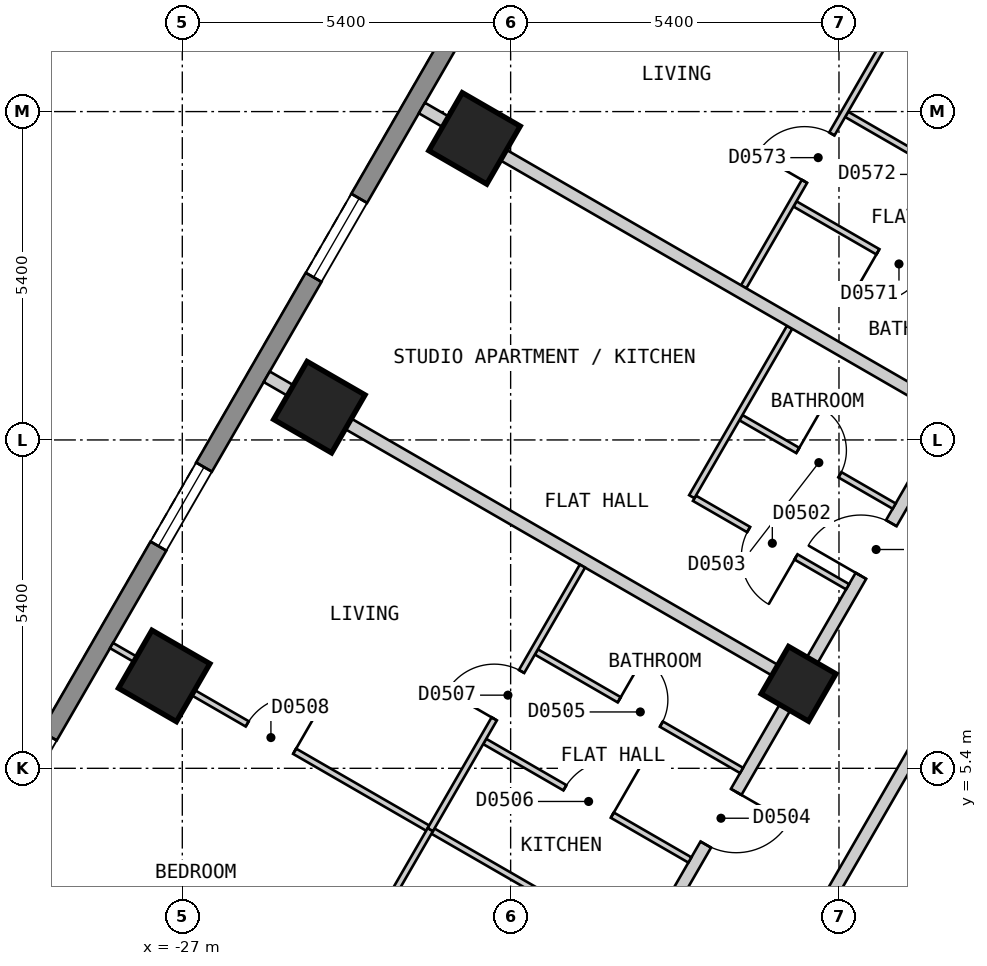
"""IFC4 building model, lengths in metres.
Left out: names, types, materials, properties, quantities, classifications, styles, units other than length and angle.
Written with IfcOpenShell. Run it as: python <this file> out.ifc"""

import sys

from ifc_helpers import new_model, si_unit, direction, frame, frame_2d, origin, origin_2d, place, context, subcontext, project, spatial, polyline, rectangle, outline, extrude, element, fill, save


model = new_model("IFC4")
c1 = context("Model", 3, precision=1e-05, world=origin(), true_north=direction((0.0, 1.0)))
c2 = subcontext(c1, "Body", "Model", "MODEL_VIEW")
j1 = project(units=[si_unit("LENGTHUNIT", "METRE"), si_unit("PLANEANGLEUNIT", "RADIAN")], contexts=[c1])
p1 = place(None, origin())
s1 = spatial("IfcSite", under=j1, at=p1, CompositionType="ELEMENT")
p2 = place(p1, origin())
s2 = spatial("IfcBuilding", under=s1, at=p2, CompositionType="ELEMENT")
p3 = place(p2, frame((0.0, 0.0, 50.4)))
s3 = spatial("IfcBuildingStorey", under=s2, at=p3, CompositionType="ELEMENT", Elevation=50.4)
for number, where, z_axis, x_axis in (
    (1, (-22.194, 15.759, 0.0), (0.0, 0.0, 1.0), (-0.5, -0.866, 0.0)),
    (2, (-24.746, 11.339, 0.0), (0.0, 0.0, 1.0), (-0.5, -0.866, 0.0)),
    (3, (-27.298, 6.919, 0.0), (0.0, 0.0, 1.0), (-0.5, -0.866, 0.0)),
):
    element("IfcColumn", number, at=place(p3, frame(where, z_axis=z_axis, x_axis=x_axis)), inside=s3, PredefinedType="COLUMN", context=c2, shape_type="SweptSolid", body=[
        extrude(rectangle(XDim=1.1, YDim=1.1, at=origin_2d()), origin(), (0.0, 0.0, 1.0), 3.0),
    ])
p4 = place(p3, frame((-16.865, 6.789, 0.0), z_axis=(0.0, 0.0, 1.0), x_axis=(-0.499984884929, -0.866034130299, 0.0)))
e4 = element("IfcColumn", 4, at=p4, inside=s3, PredefinedType="COLUMN", context=c2, shape_type="SweptSolid", body=[
    extrude(rectangle(XDim=0.9, YDim=0.9, at=origin_2d()), origin(), (0.0, 0.0, 1.0), 3.0),
])
p5 = place(p3, frame((-17.71, 25.825, 0.0), z_axis=(0.0, 0.0, 1.0), x_axis=(-0.500001938803, -0.866024284413, 0.0)))
e5 = element("IfcWall", 5, at=p5, inside=s3, PredefinedType="SOLIDWALL", context=c2, shape_type="SweptSolid", body=[
    extrude(outline(polyline([(0.0, -0.15), (27.02, -0.15), (26.94, 0.15), (0.08, 0.15), (0.0, -0.15)])), origin(), (0.0, 0.0, 1.0), 2.7),
])
p6 = place(p5, frame((2.553, 0.0, 0.15)))
e6 = element("IfcOpeningElement", 6, at=p6, cuts=e5, PredefinedType="OPENING", context=c2, shape_type="SweptSolid", body=[
    extrude(rectangle(XDim=1.5, YDim=2.1, at=frame_2d((0.75, 1.05))), frame((0.0, 0.16, 0.0), z_axis=(0.0, -1.0, 0.0), x_axis=(1.0, 0.0, 0.0)), (0.0, 0.0, 1.0), 0.32),
])
p7 = place(p5, frame((7.658, 0.0, 0.15)))
e7 = element("IfcOpeningElement", 7, at=p7, cuts=e5, PredefinedType="OPENING", context=c2, shape_type="SweptSolid", body=[
    extrude(rectangle(XDim=1.5, YDim=2.1, at=frame_2d((0.75, 1.05))), frame((0.0, 0.16, 0.0), z_axis=(0.0, -1.0, 0.0), x_axis=(1.0, 0.0, 0.0)), (0.0, 0.0, 1.0), 0.32),
])
p8 = place(p5, frame((12.761, 0.0, 0.15)))
e8 = element("IfcOpeningElement", 8, at=p8, cuts=e5, PredefinedType="OPENING", context=c2, shape_type="SweptSolid", body=[
    extrude(rectangle(XDim=1.5, YDim=2.1, at=frame_2d((0.75, 1.05))), frame((0.0, 0.16, 0.0), z_axis=(0.0, -1.0, 0.0), x_axis=(1.0, 0.0, 0.0)), (0.0, 0.0, 1.0), 0.32),
])
p9 = place(p5, frame((17.865, 0.0, 0.15)))
e9 = element("IfcOpeningElement", 9, at=p9, cuts=e5, PredefinedType="OPENING", context=c2, shape_type="SweptSolid", body=[
    extrude(rectangle(XDim=1.5, YDim=2.1, at=frame_2d((0.75, 1.05))), frame((0.0, 0.16, 0.0), z_axis=(0.0, -1.0, 0.0), x_axis=(1.0, 0.0, 0.0)), (0.0, 0.0, 1.0), 0.32),
])
p10 = place(p5, frame((22.969, 0.0, 0.15)))
e10 = element("IfcOpeningElement", 10, at=p10, cuts=e5, PredefinedType="OPENING", context=c2, shape_type="SweptSolid", body=[
    extrude(rectangle(XDim=1.5, YDim=2.1, at=frame_2d((0.75, 1.05))), frame((0.0, 0.16, 0.0), z_axis=(0.0, -1.0, 0.0), x_axis=(1.0, 0.0, 0.0)), (0.0, 0.0, 1.0), 0.32),
])
p11 = place(p3, frame((-18.244, -0.001, 0.0), z_axis=(0.0, 0.0, 1.0), x_axis=(0.499962999376, 0.866046765051, 0.0)))
e11 = element("IfcWall", 11, at=p11, inside=s3, PredefinedType="PARTITIONING", context=c2, shape_type="SweptSolid", body=[
    extrude(rectangle(XDim=18.245, YDim=0.2, at=frame_2d((9.123, 0.0))), origin(), (0.0, 0.0, 1.0), 2.7),
])
p12 = place(p11, frame((8.672, 0.0, 0.0)))
e12 = element("IfcOpeningElement", 12, at=p12, cuts=e11, PredefinedType="OPENING", context=c2, shape_type="SweptSolid", body=[
    extrude(rectangle(XDim=0.9, YDim=2.1, at=frame_2d((0.45, 1.05))), frame((0.0, 0.11, 0.0), z_axis=(0.0, -1.0, 0.0), x_axis=(1.0, 0.0, 0.0)), (0.0, 0.0, 1.0), 0.22),
])
p13 = place(p3, frame((-20.727, 0.099, 0.0), z_axis=(0.0, 0.0, 1.0), x_axis=(0.499993204491, 0.866029327138, 0.0)))
e13 = element("IfcWall", 13, at=p13, inside=s3, PredefinedType="PARTITIONING", context=c2, shape_type="SweptSolid", body=[
    extrude(rectangle(XDim=20.554, YDim=0.2, at=frame_2d((10.277, 0.0))), origin(), (0.0, 0.0, 1.0), 2.7),
])
p14 = place(p13, frame((9.776, 0.0, 0.0)))
e14 = element("IfcOpeningElement", 14, at=p14, cuts=e13, PredefinedType="OPENING", context=c2, shape_type="SweptSolid", body=[
    extrude(rectangle(XDim=1.0, YDim=2.1, at=frame_2d((0.5, 1.05))), frame((0.0, 0.11, 0.0), z_axis=(0.0, -1.0, 0.0), x_axis=(1.0, 0.0, 0.0)), (0.0, 0.0, 1.0), 0.22),
])
p15 = place(p13, frame((4.673, 0.0, 0.0)))
e15 = element("IfcOpeningElement", 15, at=p15, cuts=e13, PredefinedType="OPENING", context=c2, shape_type="SweptSolid", body=[
    extrude(rectangle(XDim=1.0, YDim=2.1, at=frame_2d((0.5, 1.05))), frame((0.0, 0.11, 0.0), z_axis=(0.0, -1.0, 0.0), x_axis=(1.0, 0.0, 0.0)), (0.0, 0.0, 1.0), 0.22),
])
p16 = place(p13, frame((14.88, 0.0, 0.0)))
e16 = element("IfcOpeningElement", 16, at=p16, cuts=e13, PredefinedType="OPENING", context=c2, shape_type="SweptSolid", body=[
    extrude(rectangle(XDim=1.0, YDim=2.1, at=frame_2d((0.5, 1.05))), frame((0.0, 0.11, 0.0), z_axis=(0.0, -1.0, 0.0), x_axis=(1.0, 0.0, 0.0)), (0.0, 0.0, 1.0), 0.22),
])
p17 = place(p3, frame((-21.177, 7.314, 0.0), z_axis=(0.0, 0.0, 1.0), x_axis=(0.865979019114, -0.500080332001, 0.0)))
e17 = element("IfcWall", 17, at=p17, inside=s3, PredefinedType="PARTITIONING", context=c2, shape_type="SweptSolid", body=[
    extrude(rectangle(XDim=3.897, YDim=0.1, at=frame_2d((1.949, 0.0))), origin(), (0.0, 0.0, 1.0), 2.7),
])
p18 = place(p17, frame((1.574, 0.0, 0.0)))
e18 = element("IfcOpeningElement", 18, at=p18, cuts=e17, PredefinedType="OPENING", context=c2, shape_type="SweptSolid", body=[
    extrude(rectangle(XDim=0.8, YDim=2.1, at=frame_2d((0.4, 1.05))), frame((0.0, 0.06, 0.0), z_axis=(0.0, -1.0, 0.0), x_axis=(1.0, 0.0, 0.0)), (0.0, 0.0, 1.0), 0.12),
])
p19 = place(p3, frame((-22.027, 5.842, 0.0), z_axis=(0.0, 0.0, 1.0), x_axis=(0.865979019114, -0.500080332001, 0.0)))
e19 = element("IfcWall", 19, at=p19, inside=s3, PredefinedType="PARTITIONING", context=c2, shape_type="SweptSolid", body=[
    extrude(rectangle(XDim=3.897, YDim=0.1, at=frame_2d((1.949, 0.0))), origin(), (0.0, 0.0, 1.0), 2.7),
])
p20 = place(p19, frame((1.524, 0.0, 0.0)))
e20 = element("IfcOpeningElement", 20, at=p20, cuts=e19, PredefinedType="OPENING", context=c2, shape_type="SweptSolid", body=[
    extrude(rectangle(XDim=0.9, YDim=2.1, at=frame_2d((0.45, 1.05))), frame((0.0, 0.06, 0.0), z_axis=(0.0, -1.0, 0.0), x_axis=(1.0, 0.0, 0.0)), (0.0, 0.0, 1.0), 0.12),
])
p21 = place(p3, frame((-28.164, 7.419, 0.0), z_axis=(0.0, 0.0, 1.0), x_axis=(0.866047370643, -0.499961950354, 0.0)))
e21 = element("IfcWall", 21, at=p21, inside=s3, PredefinedType="PARTITIONING", context=c2, shape_type="SweptSolid", body=[
    extrude(rectangle(XDim=10.001, YDim=0.1, at=frame_2d((5.0, 0.0))), origin(), (0.0, 0.0, 1.0), 2.7),
])
p22 = place(p21, frame((2.577, 0.0, 0.0)))
e22 = element("IfcOpeningElement", 22, at=p22, cuts=e21, PredefinedType="OPENING", context=c2, shape_type="SweptSolid", body=[
    extrude(rectangle(XDim=0.9, YDim=2.1, at=frame_2d((0.45, 1.05))), frame((0.0, 0.06, 0.0), z_axis=(0.0, -1.0, 0.0), x_axis=(1.0, 0.0, 0.0)), (0.0, 0.0, 1.0), 0.12),
])
p23 = place(p3, frame((-18.577, 9.841, 0.0), z_axis=(0.0, 0.0, 1.0), x_axis=(0.865899003441, -0.500218867937, 0.0)))
e23 = element("IfcWall", 23, at=p23, inside=s3, PredefinedType="PARTITIONING", context=c2, shape_type="SweptSolid", body=[
    extrude(rectangle(XDim=2.909, YDim=0.1, at=frame_2d((1.455, 0.0))), origin(), (0.0, 0.0, 1.0), 2.7),
])
p24 = place(p23, frame((1.029, 0.0, 0.0)))
e24 = element("IfcOpeningElement", 24, at=p24, cuts=e23, PredefinedType="OPENING", context=c2, shape_type="SweptSolid", body=[
    extrude(rectangle(XDim=0.9, YDim=2.1, at=frame_2d((0.45, 1.05))), frame((0.0, 0.06, 0.0), z_axis=(0.0, -1.0, 0.0), x_axis=(1.0, 0.0, 0.0)), (0.0, 0.0, 1.0), 0.12),
])
p25 = place(p3, frame((-16.923, 14.681, 0.0), z_axis=(0.0, 0.0, 1.0), x_axis=(0.866087525071, -0.499892387336, 0.0)))
e25 = element("IfcWall", 25, at=p25, inside=s3, PredefinedType="PARTITIONING", context=c2, shape_type="SweptSolid", body=[
    extrude(rectangle(XDim=3.897, YDim=0.1, at=frame_2d((1.948, 0.0))), origin(), (0.0, 0.0, 1.0), 2.7),
])
p26 = place(p25, frame((1.574, 0.0, 0.0)))
e26 = element("IfcOpeningElement", 26, at=p26, cuts=e25, PredefinedType="OPENING", context=c2, shape_type="SweptSolid", body=[
    extrude(rectangle(XDim=0.8, YDim=2.1, at=frame_2d((0.4, 1.05))), frame((0.0, 0.06, 0.0), z_axis=(0.0, -1.0, 0.0), x_axis=(1.0, 0.0, 0.0)), (0.0, 0.0, 1.0), 0.12),
])
p27 = place(p3, frame((-16.073, 16.154, 0.0), z_axis=(0.0, 0.0, 1.0), x_axis=(0.865979019114, -0.500080332001, 0.0)))
e27 = element("IfcWall", 27, at=p27, inside=s3, PredefinedType="PARTITIONING", context=c2, shape_type="SweptSolid", body=[
    extrude(rectangle(XDim=3.897, YDim=0.1, at=frame_2d((1.949, 0.0))), origin(), (0.0, 0.0, 1.0), 2.7),
])
p28 = place(p27, frame((1.524, 0.0, 0.0)))
e28 = element("IfcOpeningElement", 28, at=p28, cuts=e27, PredefinedType="OPENING", context=c2, shape_type="SweptSolid", body=[
    extrude(rectangle(XDim=0.9, YDim=2.1, at=frame_2d((0.45, 1.05))), frame((0.0, 0.06, 0.0), z_axis=(0.0, -1.0, 0.0), x_axis=(1.0, 0.0, 0.0)), (0.0, 0.0, 1.0), 0.12),
])
p29 = place(p3, frame((-17.813, 11.167, 0.0), z_axis=(0.0, 0.0, 1.0), x_axis=(0.866087824531, -0.499891868507, 0.0)))
e29 = element("IfcWall", 29, at=p29, inside=s3, PredefinedType="PARTITIONING", context=c2, shape_type="SweptSolid", body=[
    extrude(rectangle(XDim=2.911, YDim=0.1, at=frame_2d((1.456, 0.0))), origin(), (0.0, 0.0, 1.0), 2.7),
])
p30 = place(p29, frame((1.08, 0.0, 0.0)))
e30 = element("IfcOpeningElement", 30, at=p30, cuts=e29, PredefinedType="OPENING", context=c2, shape_type="SweptSolid", body=[
    extrude(rectangle(XDim=0.8, YDim=2.1, at=frame_2d((0.4, 1.05))), frame((0.0, 0.06, 0.0), z_axis=(0.0, -1.0, 0.0), x_axis=(1.0, 0.0, 0.0)), (0.0, 0.0, 1.0), 0.12),
])
p31 = place(p3, frame((-20.508, 20.679, 0.0), z_axis=(0.0, 0.0, 1.0), x_axis=(0.866047370643, -0.499961950354, 0.0)))
e31 = element("IfcWall", 31, at=p31, inside=s3, PredefinedType="PARTITIONING", context=c2, shape_type="SweptSolid", body=[
    extrude(rectangle(XDim=10.001, YDim=0.1, at=frame_2d((5.0, 0.0))), origin(), (0.0, 0.0, 1.0), 2.7),
])
p32 = place(p31, frame((2.576, 0.0, 0.0)))
e32 = element("IfcOpeningElement", 32, at=p32, cuts=e31, PredefinedType="OPENING", context=c2, shape_type="SweptSolid", body=[
    extrude(rectangle(XDim=0.9, YDim=2.1, at=frame_2d((0.45, 1.05))), frame((0.0, 0.06, 0.0), z_axis=(0.0, -1.0, 0.0), x_axis=(1.0, 0.0, 0.0)), (0.0, 0.0, 1.0), 0.12),
])
p33 = place(p3, frame((-18.621, 9.867, 0.0), z_axis=(0.0, 0.0, 1.0), x_axis=(0.500197891286, 0.865911121047, 0.0)))
e33 = element("IfcWall", 33, at=p33, inside=s3, PredefinedType="PARTITIONING", context=c2, shape_type="SweptSolid", body=[
    extrude(rectangle(XDim=3.215, YDim=0.1, at=frame_2d((1.607, 0.0))), origin(), (0.0, 0.0, 1.0), 2.7),
])
p34 = place(p3, frame((-25.358, 0.173, 0.0), z_axis=(0.0, 0.0, 1.0), x_axis=(0.500180754623, 0.8659210199, 0.0)))
e34 = element("IfcWall", 34, at=p34, inside=s3, PredefinedType="PARTITIONING", context=c2, shape_type="SweptSolid", body=[
    extrude(rectangle(XDim=4.872, YDim=0.1, at=frame_2d((2.436, 0.0))), origin(), (0.0, 0.0, 1.0), 2.7),
])
p35 = place(p34, frame((1.936, 0.0, 0.0)))
e35 = element("IfcOpeningElement", 35, at=p35, cuts=e34, PredefinedType="OPENING", context=c2, shape_type="SweptSolid", body=[
    extrude(rectangle(XDim=0.8, YDim=2.1, at=frame_2d((0.4, 1.05))), frame((0.0, 0.06, 0.0), z_axis=(0.0, -1.0, 0.0), x_axis=(1.0, 0.0, 0.0)), (0.0, 0.0, 1.0), 0.12),
])
p36 = place(p3, frame((-17.768, 13.319, 0.0), z_axis=(0.0, 0.0, 1.0), x_axis=(0.499958946799, 0.866049104564, 0.0)))
e36 = element("IfcWall", 36, at=p36, inside=s3, PredefinedType="PARTITIONING", context=c2, shape_type="SweptSolid", body=[
    extrude(rectangle(XDim=5.004, YDim=0.1, at=frame_2d((2.502, 0.0))), origin(), (0.0, 0.0, 1.0), 2.7),
])
p37 = place(p36, frame((2.002, 0.0, 0.0)))
e37 = element("IfcOpeningElement", 37, at=p37, cuts=e36, PredefinedType="OPENING", context=c2, shape_type="SweptSolid", body=[
    extrude(rectangle(XDim=0.9, YDim=2.1, at=frame_2d((0.45, 1.05))), frame((0.0, 0.06, 0.0), z_axis=(0.0, -1.0, 0.0), x_axis=(1.0, 0.0, 0.0)), (0.0, 0.0, 1.0), 0.12),
])
p38 = place(p3, frame((-25.611, 11.839, 0.0), z_axis=(0.0, 0.0, 1.0), x_axis=(0.866022959057, -0.500004234368, 0.0)))
e38 = element("IfcWall", 38, at=p38, inside=s3, PredefinedType="PARTITIONING", context=c2, shape_type="SweptSolid", body=[
    extrude(rectangle(XDim=10.0, YDim=0.2, at=frame_2d((5.0, 0.0))), origin(), (0.0, 0.0, 1.0), 2.7),
])
p39 = place(p3, frame((-23.06, 16.259, 0.0), z_axis=(0.0, 0.0, 1.0), x_axis=(0.866047370643, -0.499961950354, 0.0)))
e39 = element("IfcWall", 39, at=p39, inside=s3, PredefinedType="PARTITIONING", context=c2, shape_type="SweptSolid", body=[
    extrude(rectangle(XDim=10.001, YDim=0.2, at=frame_2d((5.0, 0.0))), origin(), (0.0, 0.0, 1.0), 2.7),
])
p40 = place(p3, frame((-22.921, 4.392, 0.0), z_axis=(0.0, 0.0, 1.0), x_axis=(0.499958946799, 0.866049104564, 0.0)))
e40 = element("IfcWall", 40, at=p40, inside=s3, PredefinedType="PARTITIONING", context=c2, shape_type="SweptSolid", body=[
    extrude(rectangle(XDim=5.004, YDim=0.1, at=frame_2d((2.502, 0.0))), origin(), (0.0, 0.0, 1.0), 2.7),
])
p41 = place(p40, frame((2.103, 0.0, 0.0)))
e41 = element("IfcOpeningElement", 41, at=p41, cuts=e40, PredefinedType="OPENING", context=c2, shape_type="SweptSolid", body=[
    extrude(rectangle(XDim=0.9, YDim=2.1, at=frame_2d((0.45, 1.05))), frame((0.0, 0.06, 0.0), z_axis=(0.0, -1.0, 0.0), x_axis=(1.0, 0.0, 0.0)), (0.0, 0.0, 1.0), 0.12),
])
p42 = place(p8, origin())
e42 = element("IfcWindow", 42, at=p42, inside=s3, PartitioningType="SINGLE_PANEL", PredefinedType="WINDOW", context=c2, shape_type="SweptSolid", body=[
    extrude(rectangle(XDim=1.5, YDim=2.1, at=frame_2d((0.75, 1.05))), frame((0.0, 0.03, 0.0), z_axis=(0.0, -1.0, 0.0), x_axis=(1.0, 0.0, 0.0)), (0.0, 0.0, 1.0), 0.06),
])
fill(e8, e42)
p43 = place(p9, origin())
e43 = element("IfcWindow", 43, at=p43, inside=s3, PartitioningType="SINGLE_PANEL", PredefinedType="WINDOW", context=c2, shape_type="SweptSolid", body=[
    extrude(rectangle(XDim=1.5, YDim=2.1, at=frame_2d((0.75, 1.05))), frame((0.0, 0.03, 0.0), z_axis=(0.0, -1.0, 0.0), x_axis=(1.0, 0.0, 0.0)), (0.0, 0.0, 1.0), 0.06),
])
fill(e9, e43)
p44 = place(p14, origin())
e44 = element("IfcDoor", 44, at=p44, inside=s3, OperationType="SINGLE_SWING_LEFT", PredefinedType="DOOR", context=c2, shape_type="SweptSolid", body=[
    extrude(rectangle(XDim=1.0, YDim=2.1, at=frame_2d((0.5, 1.05))), frame((0.0, 0.025, 0.0), z_axis=(0.0, -1.0, 0.0), x_axis=(1.0, 0.0, 0.0)), (0.0, 0.0, 1.0), 0.05),
])
fill(e14, e44)
p45 = place(p24, origin())
e45 = element("IfcDoor", 45, at=p45, inside=s3, OperationType="SINGLE_SWING_RIGHT", PredefinedType="DOOR", context=c2, shape_type="SweptSolid", body=[
    extrude(rectangle(XDim=0.9, YDim=2.1, at=frame_2d((0.45, 1.05))), frame((0.0, 0.025, 0.0), z_axis=(0.0, -1.0, 0.0), x_axis=(1.0, 0.0, 0.0)), (0.0, 0.0, 1.0), 0.05),
])
fill(e24, e45)
p46 = place(p30, origin())
e46 = element("IfcDoor", 46, at=p46, inside=s3, OperationType="SINGLE_SWING_LEFT", PredefinedType="DOOR", context=c2, shape_type="SweptSolid", body=[
    extrude(rectangle(XDim=0.8, YDim=2.1, at=frame_2d((0.4, 1.05))), frame((0.0, 0.025, 0.0), z_axis=(0.0, -1.0, 0.0), x_axis=(1.0, 0.0, 0.0)), (0.0, 0.0, 1.0), 0.05),
])
fill(e30, e46)
p47 = place(p15, origin())
e47 = element("IfcDoor", 47, at=p47, inside=s3, OperationType="SINGLE_SWING_RIGHT", PredefinedType="DOOR", context=c2, shape_type="SweptSolid", body=[
    extrude(rectangle(XDim=1.0, YDim=2.1, at=frame_2d((0.5, 1.05))), frame((0.0, 0.025, 0.0), z_axis=(0.0, -1.0, 0.0), x_axis=(1.0, 0.0, 0.0)), (0.0, 0.0, 1.0), 0.05),
])
fill(e15, e47)
p48 = place(p18, origin())
e48 = element("IfcDoor", 48, at=p48, inside=s3, OperationType="SINGLE_SWING_LEFT", PredefinedType="DOOR", context=c2, shape_type="SweptSolid", body=[
    extrude(rectangle(XDim=0.8, YDim=2.1, at=frame_2d((0.4, 1.05))), frame((0.0, 0.025, 0.0), z_axis=(0.0, -1.0, 0.0), x_axis=(1.0, 0.0, 0.0)), (0.0, 0.0, 1.0), 0.05),
])
fill(e18, e48)
p49 = place(p20, origin())
e49 = element("IfcDoor", 49, at=p49, inside=s3, OperationType="SINGLE_SWING_RIGHT", PredefinedType="DOOR", context=c2, shape_type="SweptSolid", body=[
    extrude(rectangle(XDim=0.9, YDim=2.1, at=frame_2d((0.45, 1.05))), frame((0.0, 0.025, 0.0), z_axis=(0.0, -1.0, 0.0), x_axis=(1.0, 0.0, 0.0)), (0.0, 0.0, 1.0), 0.05),
])
fill(e20, e49)
p50 = place(p41, origin())
e50 = element("IfcDoor", 50, at=p50, inside=s3, OperationType="SINGLE_SWING_LEFT", PredefinedType="DOOR", context=c2, shape_type="SweptSolid", body=[
    extrude(rectangle(XDim=0.9, YDim=2.1, at=frame_2d((0.45, 1.05))), frame((0.0, 0.025, 0.0), z_axis=(0.0, -1.0, 0.0), x_axis=(1.0, 0.0, 0.0)), (0.0, 0.0, 1.0), 0.05),
])
fill(e41, e50)
p51 = place(p22, origin())
e51 = element("IfcDoor", 51, at=p51, inside=s3, OperationType="SINGLE_SWING_RIGHT", PredefinedType="DOOR", context=c2, shape_type="SweptSolid", body=[
    extrude(rectangle(XDim=0.9, YDim=2.1, at=frame_2d((0.45, 1.05))), frame((0.0, 0.025, 0.0), z_axis=(0.0, -1.0, 0.0), x_axis=(1.0, 0.0, 0.0)), (0.0, 0.0, 1.0), 0.05),
])
fill(e22, e51)
p52 = place(p26, origin())
e52 = element("IfcDoor", 52, at=p52, inside=s3, OperationType="SINGLE_SWING_LEFT", PredefinedType="DOOR", context=c2, shape_type="SweptSolid", body=[
    extrude(rectangle(XDim=0.8, YDim=2.1, at=frame_2d((0.4, 1.05))), frame((0.0, 0.025, 0.0), z_axis=(0.0, -1.0, 0.0), x_axis=(1.0, 0.0, 0.0)), (0.0, 0.0, 1.0), 0.05),
])
fill(e26, e52)
p53 = place(p37, origin())
e53 = element("IfcDoor", 53, at=p53, inside=s3, OperationType="SINGLE_SWING_LEFT", PredefinedType="DOOR", context=c2, shape_type="SweptSolid", body=[
    extrude(rectangle(XDim=0.9, YDim=2.1, at=frame_2d((0.45, 1.05))), frame((0.0, 0.025, 0.0), z_axis=(0.0, -1.0, 0.0), x_axis=(1.0, 0.0, 0.0)), (0.0, 0.0, 1.0), 0.05),
])
fill(e37, e53)
save(model, sys.argv[1])
